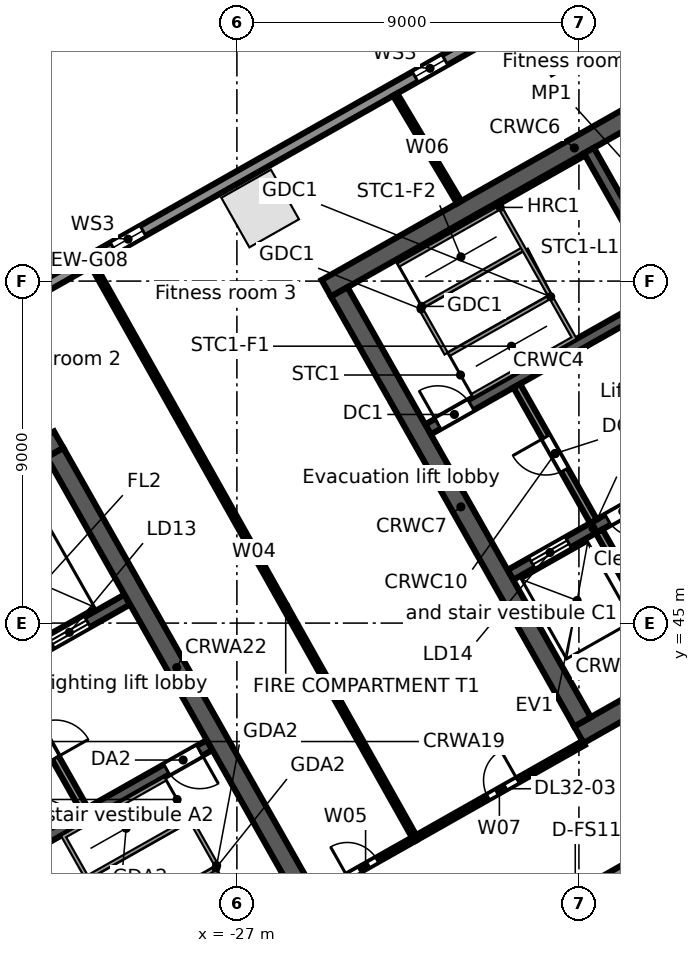
"""IFC4 building model, lengths in metres.
Left out: names, types, materials, properties, quantities, classifications, styles, units other than length and angle.
Written with IfcOpenShell. Run it as: python <this file> out.ifc"""

import sys

from ifc_helpers import new_model, si_unit, direction, frame, frame_2d, origin, origin_2d, place, context, subcontext, project, spatial, rectangle, extrude, element, fill, save


model = new_model("IFC4")
c1 = context("Model", 3, precision=1e-05, world=origin(), true_north=direction((0.0, 1.0)))
c2 = subcontext(c1, "Body", "Model", "MODEL_VIEW")
j1 = project(units=[si_unit("LENGTHUNIT", "METRE"), si_unit("PLANEANGLEUNIT", "RADIAN")], contexts=[c1])
p1 = place(None, origin())
s1 = spatial("IfcSite", under=j1, at=p1, CompositionType="ELEMENT")
p2 = place(p1, origin())
s2 = spatial("IfcBuilding", under=s1, at=p2, CompositionType="ELEMENT")
p3 = place(p2, frame((0.0, 0.0, 162.9)))
s3 = spatial("IfcBuildingStorey", under=s2, at=p3, CompositionType="ELEMENT", Elevation=162.9)
for number, where, z_axis, x_axis in (
    (1, (-18.441, 60.406, 0.0), (0.0, 0.0, 1.0), (-0.87, -0.492, 0.0)),
    (2, (-26.388, 55.91, 0.0), (0.0, 0.0, 1.0), (-0.87, -0.492, 0.0)),
):
    element("IfcColumn", number, at=place(p3, frame(where, z_axis=z_axis, x_axis=x_axis)), inside=s3, PredefinedType="COLUMN", context=c2, shape_type="SweptSolid", body=[
        extrude(rectangle(XDim=1.5, YDim=1.5, at=origin_2d()), origin(), (0.0, 0.0, 1.0), 4.0),
    ])
p4 = place(p3, frame((-0.055, 47.969, 0.0), z_axis=(0.0, 0.0, 1.0), x_axis=(-0.870355730478, -0.492423499058, 0.0)))
e3 = element("IfcWall", 3, at=p4, inside=s3, PredefinedType="STANDARD", context=c2, shape_type="SweptSolid", body=[
    extrude(rectangle(XDim=43.75, YDim=0.3, at=frame_2d((21.875, 0.0))), origin(), (0.0, 0.0, 1.0), 3.68),
])
p5 = place(p4, frame((39.977, 0.0, 0.6)))
e4 = element("IfcOpeningElement", 4, at=p5, cuts=e3, PredefinedType="OPENING", context=c2, shape_type="SweptSolid", body=[
    extrude(rectangle(XDim=0.9, YDim=2.4, at=frame_2d((0.45, 1.2))), frame((0.0, 0.16, 0.0), z_axis=(0.0, -1.0, 0.0), x_axis=(1.0, 0.0, 0.0)), (0.0, 0.0, 1.0), 0.32),
])
p6 = place(p4, frame((37.338, 0.0, 0.0)))
e5 = element("IfcOpeningElement", 5, at=p6, cuts=e3, PredefinedType="OPENING", context=c2, shape_type="SweptSolid", body=[
    extrude(rectangle(XDim=1.8, YDim=2.4, at=frame_2d((0.9, 1.2))), frame((0.0, 0.16, 0.0), z_axis=(0.0, -1.0, 0.0), x_axis=(1.0, 0.0, 0.0)), (0.0, 0.0, 1.0), 0.32),
])
p7 = place(p4, frame((31.222, 0.0, 0.6)))
e6 = element("IfcOpeningElement", 6, at=p7, cuts=e3, PredefinedType="OPENING", context=c2, shape_type="SweptSolid", body=[
    extrude(rectangle(XDim=0.9, YDim=2.4, at=frame_2d((0.45, 1.2))), frame((0.0, 0.16, 0.0), z_axis=(0.0, -1.0, 0.0), x_axis=(1.0, 0.0, 0.0)), (0.0, 0.0, 1.0), 0.32),
])
p8 = place(p4, frame((28.584, 0.0, 0.0)))
e7 = element("IfcOpeningElement", 7, at=p8, cuts=e3, PredefinedType="OPENING", context=c2, shape_type="SweptSolid", body=[
    extrude(rectangle(XDim=1.8, YDim=2.4, at=frame_2d((0.9, 1.2))), frame((0.0, 0.16, 0.0), z_axis=(0.0, -1.0, 0.0), x_axis=(1.0, 0.0, 0.0)), (0.0, 0.0, 1.0), 0.32),
])
p9 = place(p4, frame((22.468, 0.0, 0.6)))
e8 = element("IfcOpeningElement", 8, at=p9, cuts=e3, PredefinedType="OPENING", context=c2, shape_type="SweptSolid", body=[
    extrude(rectangle(XDim=0.9, YDim=2.4, at=frame_2d((0.45, 1.2))), frame((0.0, 0.16, 0.0), z_axis=(0.0, -1.0, 0.0), x_axis=(1.0, 0.0, 0.0)), (0.0, 0.0, 1.0), 0.32),
])
p10 = place(p4, frame((19.829, 0.0, 0.0)))
e9 = element("IfcOpeningElement", 9, at=p10, cuts=e3, PredefinedType="OPENING", context=c2, shape_type="SweptSolid", body=[
    extrude(rectangle(XDim=1.8, YDim=2.4, at=frame_2d((0.9, 1.2))), frame((0.0, 0.16, 0.0), z_axis=(0.0, -1.0, 0.0), x_axis=(1.0, 0.0, 0.0)), (0.0, 0.0, 1.0), 0.32),
])
p11 = place(p4, frame((13.713, 0.0, 0.6)))
e10 = element("IfcOpeningElement", 10, at=p11, cuts=e3, PredefinedType="OPENING", context=c2, shape_type="SweptSolid", body=[
    extrude(rectangle(XDim=0.9, YDim=2.4, at=frame_2d((0.45, 1.2))), frame((0.0, 0.16, 0.0), z_axis=(0.0, -1.0, 0.0), x_axis=(1.0, 0.0, 0.0)), (0.0, 0.0, 1.0), 0.32),
])
p12 = place(p4, frame((11.075, 0.0, 0.0)))
e11 = element("IfcOpeningElement", 11, at=p12, cuts=e3, PredefinedType="OPENING", context=c2, shape_type="SweptSolid", body=[
    extrude(rectangle(XDim=1.8, YDim=2.4, at=frame_2d((0.9, 1.2))), frame((0.0, 0.16, 0.0), z_axis=(0.0, -1.0, 0.0), x_axis=(1.0, 0.0, 0.0)), (0.0, 0.0, 1.0), 0.32),
])
p13 = place(p4, frame((4.959, 0.0, 0.6)))
e12 = element("IfcOpeningElement", 12, at=p13, cuts=e3, PredefinedType="OPENING", context=c2, shape_type="SweptSolid", body=[
    extrude(rectangle(XDim=0.9, YDim=2.4, at=frame_2d((0.45, 1.2))), frame((0.0, 0.16, 0.0), z_axis=(0.0, -1.0, 0.0), x_axis=(1.0, 0.0, 0.0)), (0.0, 0.0, 1.0), 0.32),
])
p14 = place(p4, frame((2.32, 0.0, 0.0)))
e13 = element("IfcOpeningElement", 13, at=p14, cuts=e3, PredefinedType="OPENING", context=c2, shape_type="SweptSolid", body=[
    extrude(rectangle(XDim=1.8, YDim=2.4, at=frame_2d((0.9, 1.2))), frame((0.0, 0.16, 0.0), z_axis=(0.0, -1.0, 0.0), x_axis=(1.0, 0.0, 0.0)), (0.0, 0.0, 1.0), 0.32),
])
p15 = place(p3, frame((-58.745, 38.764, 0.0), z_axis=(0.0, 0.0, 1.0), x_axis=(0.870355811726, 0.492423355453, 0.0)))
e14 = element("IfcWall", 14, at=p15, inside=s3, PredefinedType="STANDARD", context=c2, shape_type="SweptSolid", body=[
    extrude(rectangle(XDim=64.025, YDim=0.3, at=frame_2d((32.013, 0.0))), origin(), (0.0, 0.0, 1.0), 3.68),
])
p16 = place(p15, frame((60.122, 0.0, 0.6)))
e15 = element("IfcOpeningElement", 15, at=p16, cuts=e14, PredefinedType="OPENING", context=c2, shape_type="SweptSolid", body=[
    extrude(rectangle(XDim=0.9, YDim=2.4, at=frame_2d((0.45, 1.2))), frame((0.0, 0.16, 0.0), z_axis=(0.0, -1.0, 0.0), x_axis=(1.0, 0.0, 0.0)), (0.0, 0.0, 1.0), 0.32),
])
p17 = place(p15, frame((50.992, 0.0, 0.6)))
e16 = element("IfcOpeningElement", 16, at=p17, cuts=e14, PredefinedType="OPENING", context=c2, shape_type="SweptSolid", body=[
    extrude(rectangle(XDim=0.9, YDim=2.4, at=frame_2d((0.45, 1.2))), frame((0.0, 0.16, 0.0), z_axis=(0.0, -1.0, 0.0), x_axis=(1.0, 0.0, 0.0)), (0.0, 0.0, 1.0), 0.32),
])
p18 = place(p15, frame((41.862, 0.0, 0.6)))
e17 = element("IfcOpeningElement", 17, at=p18, cuts=e14, PredefinedType="OPENING", context=c2, shape_type="SweptSolid", body=[
    extrude(rectangle(XDim=0.9, YDim=2.4, at=frame_2d((0.45, 1.2))), frame((0.0, 0.16, 0.0), z_axis=(0.0, -1.0, 0.0), x_axis=(1.0, 0.0, 0.0)), (0.0, 0.0, 1.0), 0.32),
])
p19 = place(p15, frame((32.732, 0.0, 0.6)))
e18 = element("IfcOpeningElement", 18, at=p19, cuts=e14, PredefinedType="OPENING", context=c2, shape_type="SweptSolid", body=[
    extrude(rectangle(XDim=0.9, YDim=2.4, at=frame_2d((0.45, 1.2))), frame((0.0, 0.16, 0.0), z_axis=(0.0, -1.0, 0.0), x_axis=(1.0, 0.0, 0.0)), (0.0, 0.0, 1.0), 0.32),
])
p20 = place(p15, frame((23.602, 0.0, 0.6)))
e19 = element("IfcOpeningElement", 19, at=p20, cuts=e14, PredefinedType="OPENING", context=c2, shape_type="SweptSolid", body=[
    extrude(rectangle(XDim=0.9, YDim=2.4, at=frame_2d((0.45, 1.2))), frame((0.0, 0.16, 0.0), z_axis=(0.0, -1.0, 0.0), x_axis=(1.0, 0.0, 0.0)), (0.0, 0.0, 1.0), 0.32),
])
p21 = place(p15, frame((14.472, 0.0, 0.6)))
e20 = element("IfcOpeningElement", 20, at=p21, cuts=e14, PredefinedType="OPENING", context=c2, shape_type="SweptSolid", body=[
    extrude(rectangle(XDim=0.9, YDim=2.4, at=frame_2d((0.45, 1.2))), frame((0.0, 0.16, 0.0), z_axis=(0.0, -1.0, 0.0), x_axis=(1.0, 0.0, 0.0)), (0.0, 0.0, 1.0), 0.32),
])
p22 = place(p15, frame((5.342, 0.0, 0.6)))
e21 = element("IfcOpeningElement", 21, at=p22, cuts=e14, PredefinedType="OPENING", context=c2, shape_type="SweptSolid", body=[
    extrude(rectangle(XDim=0.9, YDim=2.4, at=frame_2d((0.45, 1.2))), frame((0.0, 0.16, 0.0), z_axis=(0.0, -1.0, 0.0), x_axis=(1.0, 0.0, 0.0)), (0.0, 0.0, 1.0), 0.32),
])
p23 = place(p3, frame((-34.245, 38.097, 0.0), z_axis=(0.0, 0.0, 1.0), x_axis=(0.870364520461, 0.492407962489, 0.0)))
e22 = element("IfcWall", 22, at=p23, inside=s3, PredefinedType="SOLIDWALL", context=c2, shape_type="SweptSolid", body=[
    extrude(rectangle(XDim=7.5, YDim=0.3, at=frame_2d((3.75, 0.0))), origin(), (0.0, 0.0, 1.0), 3.68),
])
p24 = place(p23, frame((6.2, 0.0, 0.0)))
e23 = element("IfcOpeningElement", 23, at=p24, cuts=e22, PredefinedType="OPENING", context=c2, shape_type="SweptSolid", body=[
    extrude(rectangle(XDim=1.0, YDim=2.1, at=frame_2d((0.5, 1.05))), frame((0.0, 0.16, 0.0), z_axis=(0.0, -1.0, 0.0), x_axis=(1.0, 0.0, 0.0)), (0.0, 0.0, 1.0), 0.32),
])
p25 = place(p3, frame((-37.282, 41.435, 0.0), z_axis=(0.0, 0.0, 1.0), x_axis=(0.870356271124, 0.492422543467, 0.0)))
e24 = element("IfcWall", 24, at=p25, inside=s3, PredefinedType="SOLIDWALL", context=c2, shape_type="SweptSolid", body=[
    extrude(rectangle(XDim=8.5, YDim=0.3, at=frame_2d((4.25, 0.0))), origin(), (0.0, 0.0, 1.0), 3.68),
])
p26 = place(p25, frame((6.2, 0.0, 0.0)))
e25 = element("IfcOpeningElement", 25, at=p26, cuts=e24, PredefinedType="OPENING", context=c2, shape_type="SweptSolid", body=[
    extrude(rectangle(XDim=1.1, YDim=2.1, at=frame_2d((0.55, 1.05))), frame((0.0, 0.16, 0.0), z_axis=(0.0, -1.0, 0.0), x_axis=(1.0, 0.0, 0.0)), (0.0, 0.0, 1.0), 0.32),
])
p27 = place(p25, frame((1.55, 0.0, 0.0)))
e26 = element("IfcOpeningElement", 26, at=p27, cuts=e24, PredefinedType="OPENING", context=c2, shape_type="SweptSolid", body=[
    extrude(rectangle(XDim=0.9, YDim=2.1, at=frame_2d((0.45, 1.05))), frame((0.0, 0.16, 0.0), z_axis=(0.0, -1.0, 0.0), x_axis=(1.0, 0.0, 0.0)), (0.0, 0.0, 1.0), 0.32),
])
p28 = place(p3, frame((-46.486, 41.455, 0.0), z_axis=(0.0, 0.0, 1.0), x_axis=(0.870353598469, 0.492427267353, 0.0)))
e27 = element("IfcWall", 27, at=p28, inside=s3, PredefinedType="SOLIDWALL", context=c2, shape_type="SweptSolid", body=[
    extrude(rectangle(XDim=17.0, YDim=0.5, at=frame_2d((8.5, 0.0))), origin(), (0.0, 0.0, 1.0), 3.68),
])
p29 = place(p3, frame((-33.031, 43.667, 0.0), z_axis=(0.0, 0.0, 1.0), x_axis=(0.492408451753, -0.87036424366, 0.0)))
e28 = element("IfcWall", 28, at=p29, inside=s3, PredefinedType="PARTITIONING", context=c2, shape_type="SweptSolid", body=[
    extrude(rectangle(XDim=4.1, YDim=0.2, at=frame_2d((2.05, 0.0))), origin(), (0.0, 0.0, 1.0), 3.68),
])
p30 = place(p29, frame((1.55, 0.0, 0.0)))
e29 = element("IfcOpeningElement", 29, at=p30, cuts=e28, PredefinedType="OPENING", context=c2, shape_type="SweptSolid", body=[
    extrude(rectangle(XDim=1.0, YDim=2.1, at=frame_2d((0.5, 1.05))), frame((0.0, 0.11, 0.0), z_axis=(0.0, -1.0, 0.0), x_axis=(1.0, 0.0, 0.0)), (0.0, 0.0, 1.0), 0.22),
])
p31 = place(p3, frame((-31.784, 49.486, 0.0), z_axis=(0.0, 0.0, 1.0), x_axis=(0.492435316254, -0.870349044525, 0.0)))
e30 = element("IfcWall", 30, at=p31, inside=s3, PredefinedType="SOLIDWALL", context=c2, shape_type="SweptSolid", body=[
    extrude(rectangle(XDim=13.0, YDim=0.5, at=frame_2d((6.5, 0.0))), origin(), (0.0, 0.0, 1.0), 3.68),
])
p32 = place(p3, frame((-18.0, 42.061, 0.0), z_axis=(0.0, 0.0, 1.0), x_axis=(0.870356627484, 0.492421913601, 0.0)))
e31 = element("IfcWall", 31, at=p32, inside=s3, PredefinedType="SOLIDWALL", context=c2, shape_type="SweptSolid", body=[
    extrude(rectangle(XDim=15.0, YDim=0.5, at=frame_2d((7.5, 0.0))), origin(), (0.0, 0.0, 1.0), 3.68),
])
p33 = place(p32, frame((6.1, 0.0, 0.0)))
e32 = element("IfcOpeningElement", 32, at=p33, cuts=e31, PredefinedType="OPENING", context=c2, shape_type="SweptSolid", body=[
    extrude(rectangle(XDim=1.2, YDim=2.1, at=frame_2d((0.6, 1.05))), frame((0.0, 0.26, 0.0), z_axis=(0.0, -1.0, 0.0), x_axis=(1.0, 0.0, 0.0)), (0.0, 0.0, 1.0), 0.52),
])
p34 = place(p3, frame((-19.805, 46.267, 0.0), z_axis=(0.0, 0.0, 1.0), x_axis=(0.870353598469, 0.492427267353, 0.0)))
e33 = element("IfcWall", 33, at=p34, inside=s3, PredefinedType="SOLIDWALL", context=c2, shape_type="SweptSolid", body=[
    extrude(rectangle(XDim=5.0, YDim=0.3, at=frame_2d((2.5, 0.0))), origin(), (0.0, 0.0, 1.0), 3.68),
])
p35 = place(p34, frame((0.65, 0.0, 0.0)))
e34 = element("IfcOpeningElement", 34, at=p35, cuts=e33, PredefinedType="OPENING", context=c2, shape_type="SweptSolid", body=[
    extrude(rectangle(XDim=1.1, YDim=2.1, at=frame_2d((0.55, 1.05))), frame((0.0, 0.16, 0.0), z_axis=(0.0, -1.0, 0.0), x_axis=(1.0, 0.0, 0.0)), (0.0, 0.0, 1.0), 0.32),
])
p36 = place(p34, frame((2.95, 0.0, 0.0)))
e35 = element("IfcOpeningElement", 35, at=p36, cuts=e33, PredefinedType="OPENING", context=c2, shape_type="SweptSolid", body=[
    extrude(rectangle(XDim=0.9, YDim=2.1, at=frame_2d((0.45, 1.05))), frame((0.0, 0.16, 0.0), z_axis=(0.0, -1.0, 0.0), x_axis=(1.0, 0.0, 0.0)), (0.0, 0.0, 1.0), 0.32),
])
p37 = place(p3, frame((-21.972, 50.097, 0.0), z_axis=(0.0, 0.0, 1.0), x_axis=(0.870350976978, 0.492431900747, 0.0)))
e36 = element("IfcWall", 36, at=p37, inside=s3, PredefinedType="SOLIDWALL", context=c2, shape_type="SweptSolid", body=[
    extrude(rectangle(XDim=7.3, YDim=0.3, at=frame_2d((3.65, 0.0))), origin(), (0.0, 0.0, 1.0), 3.68),
])
p38 = place(p37, frame((0.3, 0.0, 0.0)))
e37 = element("IfcOpeningElement", 37, at=p38, cuts=e36, PredefinedType="OPENING", context=c2, shape_type="SweptSolid", body=[
    extrude(rectangle(XDim=1.0, YDim=2.1, at=frame_2d((0.5, 1.05))), frame((0.0, 0.16, 0.0), z_axis=(0.0, -1.0, 0.0), x_axis=(1.0, 0.0, 0.0)), (0.0, 0.0, 1.0), 0.32),
])
p39 = place(p3, frame((-24.647, 53.811, 0.0), z_axis=(0.0, 0.0, 1.0), x_axis=(0.87034965173, 0.492434243055, 0.0)))
e38 = element("IfcWall", 38, at=p39, inside=s3, PredefinedType="SOLIDWALL", context=c2, shape_type="SweptSolid", body=[
    extrude(rectangle(XDim=15.0, YDim=0.5, at=frame_2d((7.5, 0.0))), origin(), (0.0, 0.0, 1.0), 3.68),
])
p40 = place(p3, frame((-24.307, 53.716, 0.0), z_axis=(0.0, 0.0, 1.0), x_axis=(0.492427267353, -0.870353598469, 0.0)))
e39 = element("IfcWall", 39, at=p40, inside=s3, PredefinedType="SOLIDWALL", context=c2, shape_type="SweptSolid", body=[
    extrude(rectangle(XDim=13.0, YDim=0.5, at=frame_2d((6.5, 0.0))), origin(), (0.0, 0.0, 1.0), 3.68),
])
p41 = place(p3, frame((-17.469, 47.417, 0.0), z_axis=(0.0, 0.0, 1.0), x_axis=(0.492441017253, -0.870345818929, 0.0)))
e40 = element("IfcWall", 40, at=p41, inside=s3, PredefinedType="SOLIDWALL", context=c2, shape_type="SweptSolid", body=[
    extrude(rectangle(XDim=4.15, YDim=0.2, at=frame_2d((2.075, 0.0))), origin(), (0.0, 0.0, 1.0), 3.68),
])
p42 = place(p3, frame((-19.635, 51.246, 0.0), z_axis=(0.0, 0.0, 1.0), x_axis=(0.492408451753, -0.87036424366, 0.0)))
e41 = element("IfcWall", 41, at=p42, inside=s3, PredefinedType="PARTITIONING", context=c2, shape_type="SweptSolid", body=[
    extrude(rectangle(XDim=4.1, YDim=0.2, at=frame_2d((2.05, 0.0))), origin(), (0.0, 0.0, 1.0), 3.68),
])
p43 = place(p42, frame((1.55, 0.0, 0.0)))
e42 = element("IfcOpeningElement", 42, at=p43, cuts=e41, PredefinedType="OPENING", context=c2, shape_type="SweptSolid", body=[
    extrude(rectangle(XDim=1.0, YDim=2.1, at=frame_2d((0.5, 1.05))), frame((0.0, 0.11, 0.0), z_axis=(0.0, -1.0, 0.0), x_axis=(1.0, 0.0, 0.0)), (0.0, 0.0, 1.0), 0.22),
])
p44 = place(p3, frame((-17.736, 57.434, 0.0), z_axis=(0.0, 0.0, 1.0), x_axis=(0.492421666909, -0.870356767055, 0.0)))
e43 = element("IfcWall", 43, at=p44, inside=s3, PredefinedType="SOLIDWALL", context=c2, shape_type="SweptSolid", body=[
    extrude(rectangle(XDim=4.15, YDim=0.3, at=frame_2d((2.075, 0.0))), origin(), (0.0, 0.0, 1.0), 3.68),
])
p45 = place(p3, frame((-30.785, 54.411, 0.0), z_axis=(0.0, 0.0, 1.0), x_axis=(0.490135904292, -0.871646026391, 0.0)))
e44 = element("IfcWall", 44, at=p45, inside=s3, PredefinedType="PARTITIONING", context=c2, shape_type="SweptSolid", body=[
    extrude(rectangle(XDim=17.295, YDim=0.125, at=frame_2d((8.647, 0.0))), origin(), (0.0, 0.0, 1.0), 2.852),
])
p46 = place(p3, frame((-24.919, 37.859, 0.0), z_axis=(0.0, 0.0, 1.0), x_axis=(0.870368744559, 0.492400496034, 0.0)))
e45 = element("IfcWall", 45, at=p46, inside=s3, PredefinedType="PARTITIONING", context=c2, shape_type="SweptSolid", body=[
    extrude(rectangle(XDim=3.0, YDim=0.125, at=frame_2d((1.5, 0.0))), origin(), (0.0, 0.0, 1.0), 2.852),
])
p47 = place(p46, frame((0.95, 0.0, 0.0)))
e46 = element("IfcOpeningElement", 46, at=p47, cuts=e45, PredefinedType="OPENING", context=c2, shape_type="SweptSolid", body=[
    extrude(rectangle(XDim=0.9, YDim=2.1, at=frame_2d((0.45, 1.05))), frame((0.0, 0.073, 0.0), z_axis=(0.0, -1.0, 0.0), x_axis=(1.0, 0.0, 0.0)), (0.0, 0.0, 1.0), 0.145),
])
p48 = place(p3, frame((-22.835, 58.908, 0.0), z_axis=(0.0, 0.0, 1.0), x_axis=(0.511113859879, -0.859513014584, 0.0)))
e47 = element("IfcWall", 47, at=p48, inside=s3, PredefinedType="PARTITIONING", context=c2, shape_type="SweptSolid", body=[
    extrude(rectangle(XDim=3.295, YDim=0.125, at=frame_2d((1.647, 0.0))), origin(), (0.0, 0.0, 1.0), 2.96),
])
p49 = place(p3, frame((-22.308, 39.336, 0.0), z_axis=(0.0, 0.0, 1.0), x_axis=(0.870351090701, 0.492431699747, 0.0)))
e48 = element("IfcWall", 48, at=p49, inside=s3, PredefinedType="PARTITIONING", context=c2, shape_type="SweptSolid", body=[
    extrude(rectangle(XDim=5.091, YDim=0.125, at=frame_2d((2.546, 0.0))), origin(), (0.0, 0.0, 1.0), 3.68),
])
p50 = place(p49, frame((2.2, 0.0, 0.0)))
e49 = element("IfcOpeningElement", 49, at=p50, cuts=e48, PredefinedType="OPENING", context=c2, shape_type="SweptSolid", body=[
    extrude(rectangle(XDim=0.9, YDim=2.1, at=frame_2d((0.45, 1.05))), frame((0.0, 0.073, 0.0), z_axis=(0.0, -1.0, 0.0), x_axis=(1.0, 0.0, 0.0)), (0.0, 0.0, 1.0), 0.145),
])
p51 = place(p18, origin())
e50 = element("IfcWindow", 50, at=p51, inside=s3, PartitioningType="SINGLE_PANEL", PredefinedType="WINDOW", context=c2, shape_type="SweptSolid", body=[
    extrude(rectangle(XDim=0.9, YDim=2.4, at=frame_2d((0.45, 1.2))), frame((0.0, 0.03, 0.0), z_axis=(0.0, -1.0, 0.0), x_axis=(1.0, 0.0, 0.0)), (0.0, 0.0, 1.0), 0.06),
])
fill(e17, e50)
p52 = place(p19, origin())
e51 = element("IfcWindow", 51, at=p52, inside=s3, PartitioningType="SINGLE_PANEL", PredefinedType="WINDOW", context=c2, shape_type="SweptSolid", body=[
    extrude(rectangle(XDim=0.9, YDim=2.4, at=frame_2d((0.45, 1.2))), frame((0.0, 0.03, 0.0), z_axis=(0.0, -1.0, 0.0), x_axis=(1.0, 0.0, 0.0)), (0.0, 0.0, 1.0), 0.06),
])
fill(e18, e51)
p53 = place(p26, origin())
e52 = element("IfcDoor", 52, at=p53, inside=s3, OperationType="DOUBLE_DOOR_SLIDING", PredefinedType="DOOR", context=c2, shape_type="SweptSolid", body=[
    extrude(rectangle(XDim=1.1, YDim=2.1, at=frame_2d((0.55, 1.05))), frame((0.0, 0.025, 0.0), z_axis=(0.0, -1.0, 0.0), x_axis=(1.0, 0.0, 0.0)), (0.0, 0.0, 1.0), 0.05),
])
fill(e25, e52)
p54 = place(p24, frame((1.0, 0.0, 0.0), z_axis=(0.0, 0.0, 1.0), x_axis=(-1.0, 0.0, 0.0)))
e53 = element("IfcDoor", 53, at=p54, inside=s3, OperationType="SINGLE_SWING_LEFT", PredefinedType="DOOR", context=c2, shape_type="SweptSolid", body=[
    extrude(rectangle(XDim=1.0, YDim=2.1, at=frame_2d((0.5, 1.05))), frame((0.0, 0.025, 0.0), z_axis=(0.0, -1.0, 0.0), x_axis=(1.0, 0.0, 0.0)), (0.0, 0.0, 1.0), 0.05),
])
fill(e23, e53)
p55 = place(p30, origin())
e54 = element("IfcDoor", 54, at=p55, inside=s3, OperationType="SINGLE_SWING_RIGHT", PredefinedType="DOOR", context=c2, shape_type="SweptSolid", body=[
    extrude(rectangle(XDim=1.0, YDim=2.1, at=frame_2d((0.5, 1.05))), frame((0.0, 0.025, 0.0), z_axis=(0.0, -1.0, 0.0), x_axis=(1.0, 0.0, 0.0)), (0.0, 0.0, 1.0), 0.05),
])
fill(e29, e54)
p56 = place(p35, origin())
e55 = element("IfcDoor", 55, at=p56, inside=s3, OperationType="DOUBLE_DOOR_SLIDING", PredefinedType="DOOR", context=c2, shape_type="SweptSolid", body=[
    extrude(rectangle(XDim=1.1, YDim=2.1, at=frame_2d((0.55, 1.05))), frame((0.0, 0.025, 0.0), z_axis=(0.0, -1.0, 0.0), x_axis=(1.0, 0.0, 0.0)), (0.0, 0.0, 1.0), 0.05),
])
fill(e34, e55)
p57 = place(p38, origin())
e56 = element("IfcDoor", 56, at=p57, inside=s3, OperationType="SINGLE_SWING_LEFT", PredefinedType="DOOR", context=c2, shape_type="SweptSolid", body=[
    extrude(rectangle(XDim=1.0, YDim=2.1, at=frame_2d((0.5, 1.05))), frame((0.0, 0.025, 0.0), z_axis=(0.0, -1.0, 0.0), x_axis=(1.0, 0.0, 0.0)), (0.0, 0.0, 1.0), 0.05),
])
fill(e37, e56)
p58 = place(p43, frame((1.0, 0.0, 0.0), z_axis=(0.0, 0.0, 1.0), x_axis=(-1.0, 0.0, 0.0)))
e57 = element("IfcDoor", 57, at=p58, inside=s3, OperationType="SINGLE_SWING_RIGHT", PredefinedType="DOOR", context=c2, shape_type="SweptSolid", body=[
    extrude(rectangle(XDim=1.0, YDim=2.1, at=frame_2d((0.5, 1.05))), frame((0.0, 0.025, 0.0), z_axis=(0.0, -1.0, 0.0), x_axis=(1.0, 0.0, 0.0)), (0.0, 0.0, 1.0), 0.05),
])
fill(e42, e57)
p59 = place(p36, frame((0.9, 0.0, 0.0), z_axis=(0.0, 0.0, 1.0), x_axis=(-1.0, 0.0, 0.0)))
e58 = element("IfcDoor", 58, at=p59, inside=s3, OperationType="SINGLE_SWING_LEFT", PredefinedType="DOOR", context=c2, shape_type="SweptSolid", body=[
    extrude(rectangle(XDim=0.9, YDim=2.1, at=frame_2d((0.45, 1.05))), frame((0.0, 0.025, 0.0), z_axis=(0.0, -1.0, 0.0), x_axis=(1.0, 0.0, 0.0)), (0.0, 0.0, 1.0), 0.05),
])
fill(e35, e58)
p60 = place(p47, origin())
e59 = element("IfcDoor", 59, at=p60, inside=s3, OperationType="SINGLE_SWING_LEFT", PredefinedType="DOOR", context=c2, shape_type="SweptSolid", body=[
    extrude(rectangle(XDim=0.9, YDim=2.1, at=frame_2d((0.45, 1.05))), frame((0.0, 0.025, 0.0), z_axis=(0.0, -1.0, 0.0), x_axis=(1.0, 0.0, 0.0)), (0.0, 0.0, 1.0), 0.05),
])
fill(e46, e59)
p61 = place(p50, origin())
e60 = element("IfcDoor", 60, at=p61, inside=s3, OperationType="SINGLE_SWING_RIGHT", PredefinedType="DOOR", context=c2, shape_type="SweptSolid", body=[
    extrude(rectangle(XDim=0.9, YDim=2.1, at=frame_2d((0.45, 1.05))), frame((0.0, 0.025, 0.0), z_axis=(0.0, -1.0, 0.0), x_axis=(1.0, 0.0, 0.0)), (0.0, 0.0, 1.0), 0.05),
])
fill(e49, e60)
save(model, sys.argv[1])
